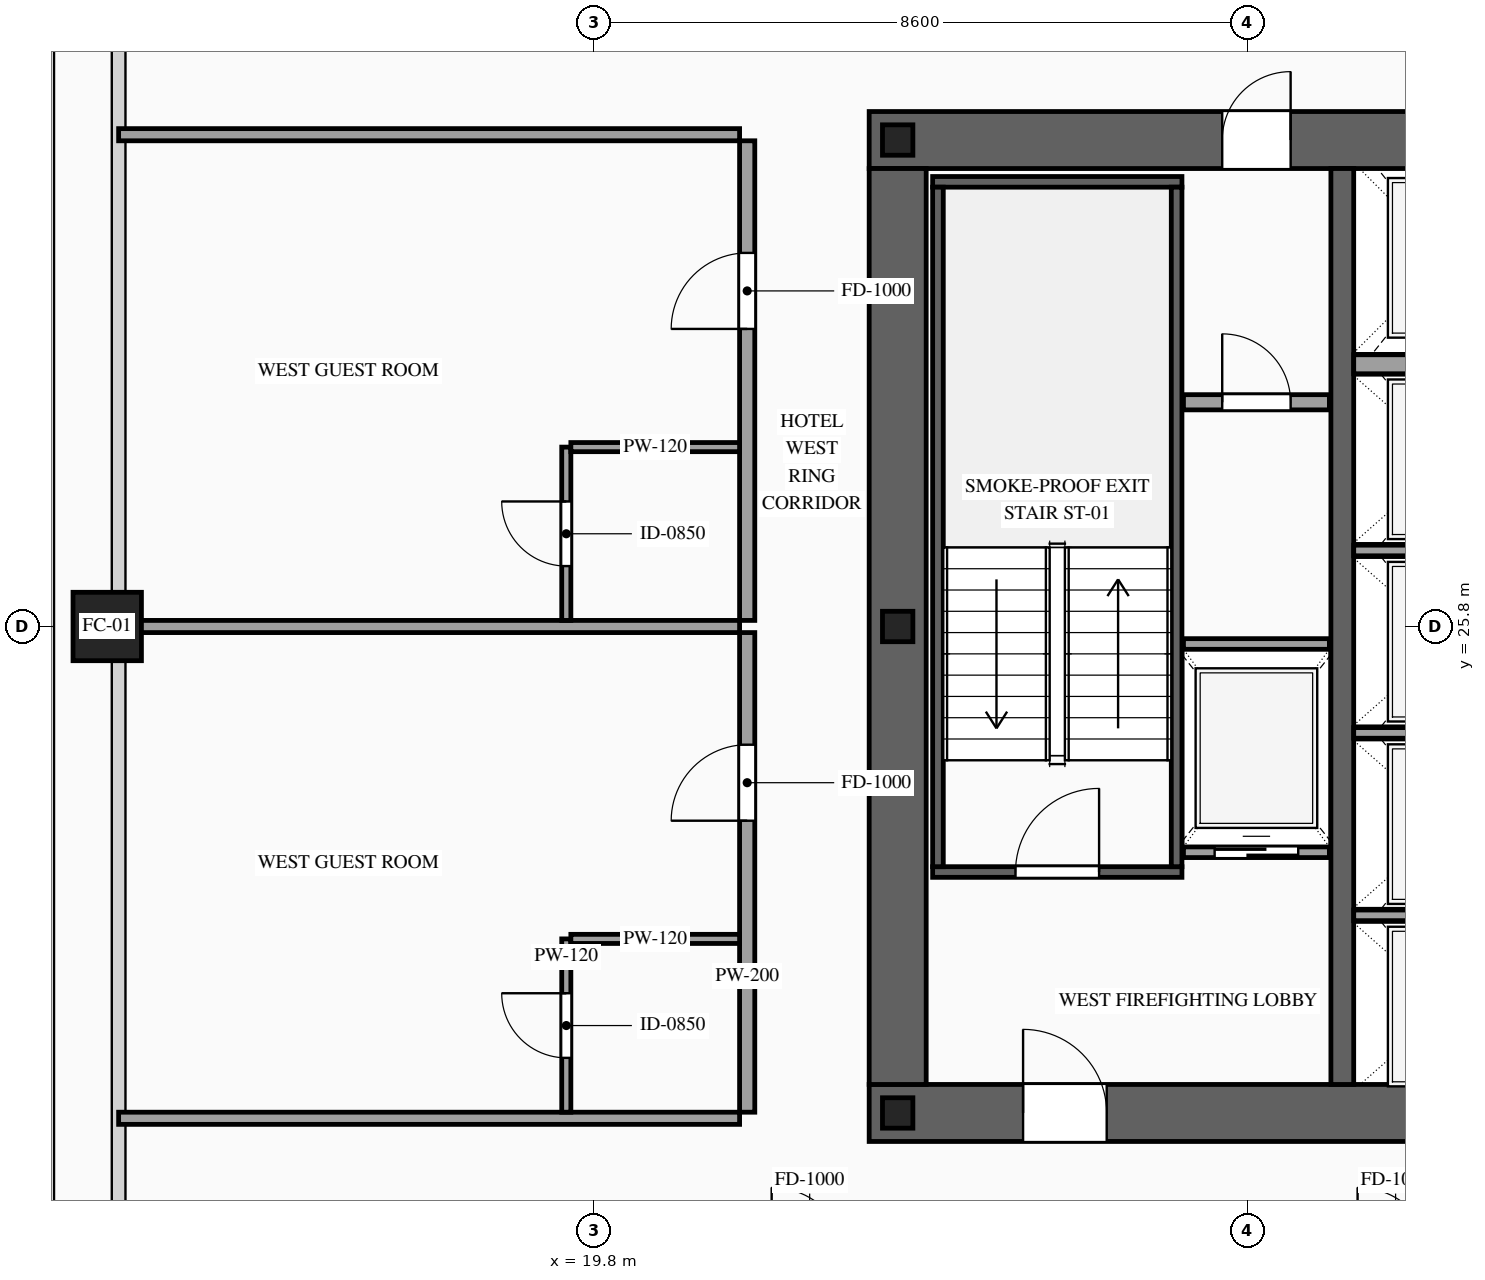
"""IFC4 building model, lengths in metres.
Left out: names, types, materials, properties, quantities, classifications, styles, units other than length and angle.
Written with IfcOpenShell. Run it as: python <this file> out.ifc"""

import sys

from ifc_helpers import new_model, si_unit, direction, frame, frame_2d, origin, origin_2d, place, context, subcontext, project, spatial, rectangle, hollow_rectangle, i_section, extrude, source, transform, mapped, element, fill, save


model = new_model("IFC4")
c1 = context("Model", 3, precision=1e-05, world=origin(), true_north=direction((0.0, 1.0)))
c2 = subcontext(c1, "Body", "Model", "MODEL_VIEW")
j1 = project(units=[si_unit("LENGTHUNIT", "METRE"), si_unit("PLANEANGLEUNIT", "RADIAN")], contexts=[c1])
p1 = place(None, origin())
s1 = spatial("IfcSite", under=j1, at=p1, CompositionType="ELEMENT")
p2 = place(p1, origin())
s2 = spatial("IfcBuilding", under=s1, at=p2, CompositionType="ELEMENT")
p3 = place(p2, frame((0.0, 0.0, 134.4)))
s3 = spatial("IfcBuildingStorey", under=s2, at=p3, CompositionType="ELEMENT", Elevation=134.4)
p4 = place(p3, frame((23.425, 19.4, 0.0), z_axis=(0.0, 0.0, 1.0), x_axis=(1.0, 0.0, 0.0)))
e1 = element("IfcWall", 1, at=p4, inside=s3, PredefinedType="SHEAR", context=c2, shape_type="SweptSolid", body=[
    extrude(rectangle(XDim=27.15, YDim=0.75, at=frame_2d((13.575, 0.0))), origin(), (0.0, 0.0, 1.0), 3.6),
])
p5 = place(p4, frame((2.025, 0.0, 0.0)))
e2 = element("IfcOpeningElement", 2, at=p5, cuts=e1, PredefinedType="OPENING", context=c2, shape_type="SweptSolid", body=[
    extrude(rectangle(XDim=1.1, YDim=2.2, at=frame_2d((0.55, 1.1))), frame((0.0, 0.39, 0.0), z_axis=(0.0, -1.0, 0.0), x_axis=(1.0, 0.0, 0.0)), (0.0, 0.0, 1.0), 0.78),
])
p6 = place(p4, frame((9.925, 0.0, 0.0)))
e3 = element("IfcOpeningElement", 3, at=p6, cuts=e1, PredefinedType="OPENING", context=c2, shape_type="SweptSolid", body=[
    extrude(rectangle(XDim=1.1, YDim=2.2, at=frame_2d((0.55, 1.1))), frame((0.0, 0.39, 0.0), z_axis=(0.0, -1.0, 0.0), x_axis=(1.0, 0.0, 0.0)), (0.0, 0.0, 1.0), 0.78),
])
p7 = place(p4, frame((23.125, 0.0, 0.0)))
e4 = element("IfcOpeningElement", 4, at=p7, cuts=e1, PredefinedType="OPENING", context=c2, shape_type="SweptSolid", body=[
    extrude(rectangle(XDim=1.1, YDim=2.2, at=frame_2d((0.55, 1.1))), frame((0.0, 0.39, 0.0), z_axis=(0.0, -1.0, 0.0), x_axis=(1.0, 0.0, 0.0)), (0.0, 0.0, 1.0), 0.78),
])
p8 = place(p4, frame((19.745, 0.0, 0.0)))
e5 = element("IfcOpeningElement", 5, at=p8, cuts=e1, PredefinedType="OPENING", context=c2, shape_type="SweptSolid", body=[
    extrude(rectangle(XDim=0.9, YDim=2.15, at=frame_2d((0.45, 1.075))), frame((0.0, 0.39, 0.0), z_axis=(0.0, -1.0, 0.0), x_axis=(1.0, 0.0, 0.0)), (0.0, 0.0, 1.0), 0.78),
])
p9 = place(p4, frame((18.305, 0.0, 0.0)))
e6 = element("IfcOpeningElement", 6, at=p9, cuts=e1, PredefinedType="OPENING", context=c2, shape_type="SweptSolid", body=[
    extrude(rectangle(XDim=0.9, YDim=2.15, at=frame_2d((0.45, 1.075))), frame((0.0, 0.39, 0.0), z_axis=(0.0, -1.0, 0.0), x_axis=(1.0, 0.0, 0.0)), (0.0, 0.0, 1.0), 0.78),
])
p10 = place(p3, frame((23.425, 32.2, 0.0), z_axis=(0.0, 0.0, 1.0), x_axis=(1.0, 0.0, 0.0)))
e7 = element("IfcWall", 7, at=p10, inside=s3, PredefinedType="SHEAR", context=c2, shape_type="SweptSolid", body=[
    extrude(rectangle(XDim=27.15, YDim=0.75, at=frame_2d((13.575, 0.0))), origin(), (0.0, 0.0, 1.0), 3.6),
])
p11 = place(p10, frame((4.645, 0.0, 0.0)))
e8 = element("IfcOpeningElement", 8, at=p11, cuts=e7, PredefinedType="OPENING", context=c2, shape_type="SweptSolid", body=[
    extrude(rectangle(XDim=0.9, YDim=2.15, at=frame_2d((0.45, 1.075))), frame((0.0, 0.39, 0.0), z_axis=(0.0, -1.0, 0.0), x_axis=(1.0, 0.0, 0.0)), (0.0, 0.0, 1.0), 0.78),
])
p12 = place(p10, frame((9.925, 0.0, 0.0)))
e9 = element("IfcOpeningElement", 9, at=p12, cuts=e7, PredefinedType="OPENING", context=c2, shape_type="SweptSolid", body=[
    extrude(rectangle(XDim=1.1, YDim=2.2, at=frame_2d((0.55, 1.1))), frame((0.0, 0.39, 0.0), z_axis=(0.0, -1.0, 0.0), x_axis=(1.0, 0.0, 0.0)), (0.0, 0.0, 1.0), 0.78),
])
p13 = place(p10, frame((15.775, 0.0, 0.0)))
e10 = element("IfcOpeningElement", 10, at=p13, cuts=e7, PredefinedType="OPENING", context=c2, shape_type="SweptSolid", body=[
    extrude(rectangle(XDim=1.1, YDim=2.2, at=frame_2d((0.55, 1.1))), frame((0.0, 0.39, 0.0), z_axis=(0.0, -1.0, 0.0), x_axis=(1.0, 0.0, 0.0)), (0.0, 0.0, 1.0), 0.78),
])
p14 = place(p10, frame((18.975, 0.0, 0.0)))
e11 = element("IfcOpeningElement", 11, at=p14, cuts=e7, PredefinedType="OPENING", context=c2, shape_type="SweptSolid", body=[
    extrude(rectangle(XDim=0.9, YDim=2.15, at=frame_2d((0.45, 1.075))), frame((0.0, 0.39, 0.0), z_axis=(0.0, -1.0, 0.0), x_axis=(1.0, 0.0, 0.0)), (0.0, 0.0, 1.0), 0.78),
])
m1 = source(origin(), c2, "Body", "SweptSolid", [
    extrude(rectangle(XDim=12.05, YDim=0.75, at=frame_2d((6.025, 0.0))), origin(), (0.0, 0.0, 1.0), 3.6),
])
p15 = place(p3, frame((23.8, 19.775, 0.0), z_axis=(0.0, 0.0, 1.0), x_axis=(0.0, 1.0, 0.0)))
e12 = element("IfcWall", 12, at=p15, inside=s3, PredefinedType="SHEAR", context=c2, shape_type="MappedRepresentation", body=[
    mapped(m1, transform((0.0, 0.0, 0.0), scale=1.0)),
])
m2 = source(origin(), c2, "Body", "SweptSolid", [
    extrude(rectangle(XDim=12.05, YDim=0.3, at=frame_2d((6.025, 0.0))), origin(), (0.0, 0.0, 1.0), 3.6),
])
p16 = place(p3, frame((29.65, 19.775, 0.0), z_axis=(0.0, 0.0, 1.0), x_axis=(0.0, 1.0, 0.0)))
e13 = element("IfcWall", 13, at=p16, inside=s3, PredefinedType="SOLIDWALL", context=c2, shape_type="MappedRepresentation", body=[
    mapped(m2, transform((0.0, 0.0, 0.0), scale=1.0)),
])
m3 = source(origin(), c2, "Body", "SweptSolid", [
    extrude(i_section(OverallWidth=0.4, OverallDepth=0.4, WebThickness=0.013, FlangeThickness=0.021, at=origin_2d()), origin(), (0.0, 0.0, 1.0), 3.6),
])
for number, where, z_axis, x_axis in (
    (14, (23.8, 19.4, 0.0), (0.0, 0.0, 1.0), (1.0, 0.0, 0.0)),
    (15, (23.8, 25.8, 0.0), (0.0, 0.0, 1.0), (1.0, 0.0, 0.0)),
    (16, (23.8, 32.2, 0.0), (0.0, 0.0, 1.0), (1.0, 0.0, 0.0)),
):
    element("IfcColumn", number, at=place(p3, frame(where, z_axis=z_axis, x_axis=x_axis)), inside=s3, PredefinedType="COLUMN", context=c2, shape_type="MappedRepresentation", body=[
        mapped(m3, transform((0.0, 0.0, 0.0), scale=1.0)),
    ])
m4 = source(origin(), c2, "Body", "SweptSolid", [
    extrude(hollow_rectangle(XDim=0.9, YDim=0.9, WallThickness=0.042, at=origin_2d()), origin(), (0.0, 0.0, 1.0), 3.6),
])
p17 = place(p3, frame((13.4, 25.8, 0.0), z_axis=(0.0, 0.0, 1.0), x_axis=(1.0, 0.0, 0.0)))
e17 = element("IfcColumn", 17, at=p17, inside=s3, PredefinedType="COLUMN", context=c2, shape_type="MappedRepresentation", body=[
    mapped(m4, transform((0.0, 0.0, 0.0), scale=1.0)),
])
p18 = place(p3, frame((27.56, 22.83, 0.0), z_axis=(0.0, 0.0, 1.0), x_axis=(1.0, 0.0, 0.0)))
e18 = element("IfcWall", 18, at=p18, inside=s3, PredefinedType="SOLIDWALL", context=c2, shape_type="SweptSolid", body=[
    extrude(rectangle(XDim=1.92, YDim=0.14, at=frame_2d((0.96, 0.0))), origin(), (0.0, 0.0, 1.0), 3.38),
])
p19 = place(p18, frame((0.41, 0.0, 0.0)))
e19 = element("IfcOpeningElement", 19, at=p19, cuts=e18, PredefinedType="OPENING", context=c2, shape_type="SweptSolid", body=[
    extrude(rectangle(XDim=1.1, YDim=2.2, at=frame_2d((0.55, 1.1))), frame((0.0, 0.085, 0.0), z_axis=(0.0, -1.0, 0.0), x_axis=(1.0, 0.0, 0.0)), (0.0, 0.0, 1.0), 0.17),
])
m5 = source(origin(), c2, "Body", "SweptSolid", [
    extrude(rectangle(XDim=1.92, YDim=0.14, at=frame_2d((0.96, 0.0))), origin(), (0.0, 0.0, 1.0), 3.38),
])
p20 = place(p3, frame((27.56, 25.57, 0.0), z_axis=(0.0, 0.0, 1.0), x_axis=(1.0, 0.0, 0.0)))
e20 = element("IfcWall", 20, at=p20, inside=s3, PredefinedType="SOLIDWALL", context=c2, shape_type="MappedRepresentation", body=[
    mapped(m5, transform((0.0, 0.0, 0.0), scale=1.0)),
])
m6 = source(origin(), c2, "Body", "SweptSolid", [
    extrude(rectangle(XDim=2.5, YDim=0.14, at=frame_2d((1.25, 0.0))), origin(), (0.0, 0.0, 1.0), 3.38),
])
for number, where, z_axis, x_axis in (
    (21, (29.8, 22.0, 0.0), (0.0, 0.0, 1.0), (1.0, 0.0, 0.0)),
    (22, (29.8, 24.4, 0.0), (0.0, 0.0, 1.0), (1.0, 0.0, 0.0)),
    (23, (29.8, 26.8, 0.0), (0.0, 0.0, 1.0), (1.0, 0.0, 0.0)),
):
    element("IfcWall", number, at=place(p3, frame(where, z_axis=z_axis, x_axis=x_axis)), inside=s3, PredefinedType="SOLIDWALL", context=c2, shape_type="MappedRepresentation", body=[
        mapped(m6, transform((0.0, 0.0, 0.0), scale=1.0)),
    ])
m7 = source(origin(), c2, "Body", "SweptSolid", [
    extrude(rectangle(XDim=2.5, YDim=0.25, at=frame_2d((1.25, 0.0))), origin(), (0.0, 0.0, 1.0), 3.38),
])
p21 = place(p3, frame((29.8, 29.25, 0.0), z_axis=(0.0, 0.0, 1.0), x_axis=(1.0, 0.0, 0.0)))
e24 = element("IfcWall", 24, at=p21, inside=s3, PredefinedType="SOLIDWALL", context=c2, shape_type="MappedRepresentation", body=[
    mapped(m7, transform((0.0, 0.0, 0.0), scale=1.0)),
])
p22 = place(p3, frame((24.26, 22.57, 0.0), z_axis=(0.0, 0.0, 1.0), x_axis=(1.0, 0.0, 0.0)))
e25 = element("IfcWall", 25, at=p22, inside=s3, PredefinedType="SOLIDWALL", context=c2, shape_type="SweptSolid", body=[
    extrude(rectangle(XDim=3.28, YDim=0.14, at=frame_2d((1.64, 0.0))), origin(), (0.0, 0.0, 1.0), 3.38),
])
p23 = place(p22, frame((1.09, 0.0, 0.0)))
e26 = element("IfcOpeningElement", 26, at=p23, cuts=e25, PredefinedType="OPENING", context=c2, shape_type="SweptSolid", body=[
    extrude(rectangle(XDim=1.1, YDim=2.2, at=frame_2d((0.55, 1.1))), frame((0.0, 0.085, 0.0), z_axis=(0.0, -1.0, 0.0), x_axis=(1.0, 0.0, 0.0)), (0.0, 0.0, 1.0), 0.17),
])
m8 = source(origin(), c2, "Body", "SweptSolid", [
    extrude(rectangle(XDim=3.28, YDim=0.14, at=frame_2d((1.64, 0.0))), origin(), (0.0, 0.0, 1.0), 3.38),
])
p24 = place(p3, frame((24.26, 31.65, 0.0), z_axis=(0.0, 0.0, 1.0), x_axis=(1.0, 0.0, 0.0)))
e27 = element("IfcWall", 27, at=p24, inside=s3, PredefinedType="SOLIDWALL", context=c2, shape_type="MappedRepresentation", body=[
    mapped(m8, transform((0.0, 0.0, 0.0), scale=1.0)),
])
m9 = source(origin(), c2, "Body", "SweptSolid", [
    extrude(rectangle(XDim=8.94, YDim=0.14, at=frame_2d((4.47, 0.0))), origin(), (0.0, 0.0, 1.0), 3.38),
])
for number, where, z_axis, x_axis in (
    (28, (24.33, 22.64, 0.0), (0.0, 0.0, 1.0), (0.0, 1.0, 0.0)),
    (29, (27.47, 22.64, 0.0), (0.0, 0.0, 1.0), (0.0, 1.0, 0.0)),
):
    element("IfcWall", number, at=place(p3, frame(where, z_axis=z_axis, x_axis=x_axis)), inside=s3, PredefinedType="SOLIDWALL", context=c2, shape_type="MappedRepresentation", body=[
        mapped(m9, transform((0.0, 0.0, 0.0), scale=1.0)),
    ])
p25 = place(p3, frame((27.56, 28.75, 0.0), z_axis=(0.0, 0.0, 1.0), x_axis=(1.0, 0.0, 0.0)))
e30 = element("IfcWall", 30, at=p25, inside=s3, PredefinedType="PARTITIONING", context=c2, shape_type="SweptSolid", body=[
    extrude(rectangle(XDim=1.92, YDim=0.2, at=frame_2d((0.96, 0.0))), origin(), (0.0, 0.0, 1.0), 3.38),
])
p26 = place(p25, frame((0.51, 0.0, 0.0)))
e31 = element("IfcOpeningElement", 31, at=p26, cuts=e30, PredefinedType="OPENING", context=c2, shape_type="SweptSolid", body=[
    extrude(rectangle(XDim=0.9, YDim=2.15, at=frame_2d((0.45, 1.075))), frame((0.0, 0.115, 0.0), z_axis=(0.0, -1.0, 0.0), x_axis=(1.0, 0.0, 0.0)), (0.0, 0.0, 1.0), 0.23),
])
p27 = place(p3, frame((21.82, 19.41, 0.0), z_axis=(0.0, 0.0, 1.0), x_axis=(0.0, 1.0, 0.0)))
e32 = element("IfcWall", 32, at=p27, inside=s3, PredefinedType="PARTITIONING", context=c2, shape_type="SweptSolid", body=[
    extrude(rectangle(XDim=6.31, YDim=0.2, at=frame_2d((3.155, 0.0))), origin(), (0.0, 0.0, 1.0), 3.38),
])
p28 = place(p27, frame((3.835, 0.0, 0.0)))
e33 = element("IfcOpeningElement", 33, at=p28, cuts=e32, PredefinedType="OPENING", context=c2, shape_type="SweptSolid", body=[
    extrude(rectangle(XDim=1.0, YDim=2.2, at=frame_2d((0.5, 1.1))), frame((0.0, 0.115, 0.0), z_axis=(0.0, -1.0, 0.0), x_axis=(1.0, 0.0, 0.0)), (0.0, 0.0, 1.0), 0.23),
])
m10 = source(origin(), c2, "Body", "SweptSolid", [
    extrude(rectangle(XDim=8.17, YDim=0.16, at=frame_2d((4.085, 0.0))), origin(), (0.0, 0.0, 1.0), 2.675),
])
p29 = place(p3, frame((13.55, 25.8, 0.0), z_axis=(0.0, 0.0, 1.0), x_axis=(1.0, 0.0, 0.0)))
e34 = element("IfcWall", 34, at=p29, inside=s3, PredefinedType="PARTITIONING", context=c2, shape_type="MappedRepresentation", body=[
    mapped(m10, transform((0.0, 0.0, 0.0), scale=1.0)),
])
m11 = source(origin(), c2, "Body", "SweptSolid", [
    extrude(rectangle(XDim=8.17, YDim=0.16, at=frame_2d((4.085, 0.0))), origin(), (0.0, 0.0, 1.0), 2.875),
])
p30 = place(p3, frame((13.55, 19.33, 0.0), z_axis=(0.0, 0.0, 1.0), x_axis=(1.0, 0.0, 0.0)))
e35 = element("IfcWall", 35, at=p30, inside=s3, PredefinedType="PARTITIONING", context=c2, shape_type="MappedRepresentation", body=[
    mapped(m11, transform((0.0, 0.0, 0.0), scale=1.0)),
])
p31 = place(p3, frame((19.44, 19.41, 0.0), z_axis=(0.0, 0.0, 1.0), x_axis=(0.0, 1.0, 0.0)))
e36 = element("IfcWall", 36, at=p31, inside=s3, PredefinedType="PARTITIONING", context=c2, shape_type="SweptSolid", body=[
    extrude(rectangle(XDim=2.28, YDim=0.12, at=frame_2d((1.14, 0.0))), origin(), (0.0, 0.0, 1.0), 3.38),
])
p32 = place(p31, frame((0.715, 0.0, 0.0)))
e37 = element("IfcOpeningElement", 37, at=p32, cuts=e36, PredefinedType="OPENING", context=c2, shape_type="SweptSolid", body=[
    extrude(rectangle(XDim=0.85, YDim=2.1, at=frame_2d((0.425, 1.05))), frame((0.0, 0.075, 0.0), z_axis=(0.0, -1.0, 0.0), x_axis=(1.0, 0.0, 0.0)), (0.0, 0.0, 1.0), 0.15),
])
m12 = source(origin(), c2, "Body", "SweptSolid", [
    extrude(rectangle(XDim=2.22, YDim=0.12, at=frame_2d((1.11, 0.0))), origin(), (0.0, 0.0, 1.0), 3.38),
])
p33 = place(p3, frame((19.5, 21.69, 0.0), z_axis=(0.0, 0.0, 1.0), x_axis=(1.0, 0.0, 0.0)))
e38 = element("IfcWall", 38, at=p33, inside=s3, PredefinedType="PARTITIONING", context=c2, shape_type="MappedRepresentation", body=[
    mapped(m12, transform((0.0, 0.0, 0.0), scale=1.0)),
])
p34 = place(p3, frame((21.82, 25.88, 0.0), z_axis=(0.0, 0.0, 1.0), x_axis=(0.0, 1.0, 0.0)))
e39 = element("IfcWall", 39, at=p34, inside=s3, PredefinedType="PARTITIONING", context=c2, shape_type="SweptSolid", body=[
    extrude(rectangle(XDim=6.31, YDim=0.2, at=frame_2d((3.155, 0.0))), origin(), (0.0, 0.0, 1.0), 3.38),
])
p35 = place(p34, frame((3.835, 0.0, 0.0)))
e40 = element("IfcOpeningElement", 40, at=p35, cuts=e39, PredefinedType="OPENING", context=c2, shape_type="SweptSolid", body=[
    extrude(rectangle(XDim=1.0, YDim=2.2, at=frame_2d((0.5, 1.1))), frame((0.0, 0.115, 0.0), z_axis=(0.0, -1.0, 0.0), x_axis=(1.0, 0.0, 0.0)), (0.0, 0.0, 1.0), 0.23),
])
p36 = place(p3, frame((13.55, 32.27, 0.0), z_axis=(0.0, 0.0, 1.0), x_axis=(1.0, 0.0, 0.0)))
e41 = element("IfcWall", 41, at=p36, inside=s3, PredefinedType="PARTITIONING", context=c2, shape_type="MappedRepresentation", body=[
    mapped(m11, transform((0.0, 0.0, 0.0), scale=1.0)),
])
p37 = place(p3, frame((19.44, 25.88, 0.0), z_axis=(0.0, 0.0, 1.0), x_axis=(0.0, 1.0, 0.0)))
e42 = element("IfcWall", 42, at=p37, inside=s3, PredefinedType="PARTITIONING", context=c2, shape_type="SweptSolid", body=[
    extrude(rectangle(XDim=2.28, YDim=0.12, at=frame_2d((1.14, 0.0))), origin(), (0.0, 0.0, 1.0), 3.38),
])
p38 = place(p37, frame((0.715, 0.0, 0.0)))
e43 = element("IfcOpeningElement", 43, at=p38, cuts=e42, PredefinedType="OPENING", context=c2, shape_type="SweptSolid", body=[
    extrude(rectangle(XDim=0.85, YDim=2.1, at=frame_2d((0.425, 1.05))), frame((0.0, 0.075, 0.0), z_axis=(0.0, -1.0, 0.0), x_axis=(1.0, 0.0, 0.0)), (0.0, 0.0, 1.0), 0.15),
])
p39 = place(p3, frame((19.5, 28.16, 0.0), z_axis=(0.0, 0.0, 1.0), x_axis=(1.0, 0.0, 0.0)))
e44 = element("IfcWall", 44, at=p39, inside=s3, PredefinedType="PARTITIONING", context=c2, shape_type="MappedRepresentation", body=[
    mapped(m12, transform((0.0, 0.0, 0.0), scale=1.0)),
])
m13 = source(origin(), c2, "Body", "SweptSolid", [
    extrude(rectangle(XDim=1.1, YDim=2.2, at=frame_2d((0.55, 1.1))), frame((0.0, 0.025, 0.0), z_axis=(0.0, -1.0, 0.0), x_axis=(1.0, 0.0, 0.0)), (0.0, 0.0, 1.0), 0.05),
])
p40 = place(p19, origin())
e45 = element("IfcDoor", 45, at=p40, inside=s3, OperationType="SLIDING_TO_LEFT", PredefinedType="DOOR", context=c2, shape_type="MappedRepresentation", body=[
    mapped(m13, transform((0.0, 0.0, 0.0), scale=1.0)),
])
fill(e19, e45)
m14 = source(origin(), c2, "Body", "SweptSolid", [
    extrude(rectangle(XDim=1.1, YDim=2.2, at=frame_2d((0.55, 1.1))), frame((0.0, 0.025, 0.0), z_axis=(0.0, -1.0, 0.0), x_axis=(1.0, 0.0, 0.0)), (0.0, 0.0, 1.0), 0.05),
])
p41 = place(p23, origin())
e46 = element("IfcDoor", 46, at=p41, inside=s3, OperationType="SINGLE_SWING_RIGHT", PredefinedType="DOOR", context=c2, shape_type="MappedRepresentation", body=[
    mapped(m14, transform((0.0, 0.0, 0.0), scale=1.0)),
])
fill(e26, e46)
p42 = place(p5, origin())
e47 = element("IfcDoor", 47, at=p42, inside=s3, OperationType="SINGLE_SWING_LEFT", PredefinedType="DOOR", context=c2, shape_type="MappedRepresentation", body=[
    mapped(m14, transform((0.0, 0.0, 0.0), scale=1.0)),
])
fill(e2, e47)
m15 = source(origin(), c2, "Body", "SweptSolid", [
    extrude(rectangle(XDim=0.9, YDim=2.15, at=frame_2d((0.45, 1.075))), frame((0.0, 0.025, 0.0), z_axis=(0.0, -1.0, 0.0), x_axis=(1.0, 0.0, 0.0)), (0.0, 0.0, 1.0), 0.05),
])
p43 = place(p11, origin())
e48 = element("IfcDoor", 48, at=p43, inside=s3, OperationType="SINGLE_SWING_RIGHT", PredefinedType="DOOR", context=c2, shape_type="MappedRepresentation", body=[
    mapped(m15, transform((0.0, 0.0, 0.0), scale=1.0)),
])
fill(e8, e48)
p44 = place(p26, origin())
e49 = element("IfcDoor", 49, at=p44, inside=s3, OperationType="SINGLE_SWING_LEFT", PredefinedType="DOOR", context=c2, shape_type="MappedRepresentation", body=[
    mapped(m15, transform((0.0, 0.0, 0.0), scale=1.0)),
])
fill(e31, e49)
m16 = source(origin(), c2, "Body", "SweptSolid", [
    extrude(rectangle(XDim=1.0, YDim=2.2, at=frame_2d((0.5, 1.1))), frame((0.0, 0.025, 0.0), z_axis=(0.0, -1.0, 0.0), x_axis=(1.0, 0.0, 0.0)), (0.0, 0.0, 1.0), 0.05),
])
p45 = place(p28, origin())
e50 = element("IfcDoor", 50, at=p45, inside=s3, OperationType="SINGLE_SWING_LEFT", PredefinedType="DOOR", context=c2, shape_type="MappedRepresentation", body=[
    mapped(m16, transform((0.0, 0.0, 0.0), scale=1.0)),
])
fill(e33, e50)
m17 = source(origin(), c2, "Body", "SweptSolid", [
    extrude(rectangle(XDim=0.85, YDim=2.1, at=frame_2d((0.425, 1.05))), frame((0.0, 0.025, 0.0), z_axis=(0.0, -1.0, 0.0), x_axis=(1.0, 0.0, 0.0)), (0.0, 0.0, 1.0), 0.05),
])
p46 = place(p32, origin())
e51 = element("IfcDoor", 51, at=p46, inside=s3, OperationType="SINGLE_SWING_RIGHT", PredefinedType="DOOR", context=c2, shape_type="MappedRepresentation", body=[
    mapped(m17, transform((0.0, 0.0, 0.0), scale=1.0)),
])
fill(e37, e51)
p47 = place(p35, origin())
e52 = element("IfcDoor", 52, at=p47, inside=s3, OperationType="SINGLE_SWING_LEFT", PredefinedType="DOOR", context=c2, shape_type="MappedRepresentation", body=[
    mapped(m16, transform((0.0, 0.0, 0.0), scale=1.0)),
])
fill(e40, e52)
p48 = place(p38, origin())
e53 = element("IfcDoor", 53, at=p48, inside=s3, OperationType="SINGLE_SWING_RIGHT", PredefinedType="DOOR", context=c2, shape_type="MappedRepresentation", body=[
    mapped(m17, transform((0.0, 0.0, 0.0), scale=1.0)),
])
fill(e43, e53)
save(model, sys.argv[1])
